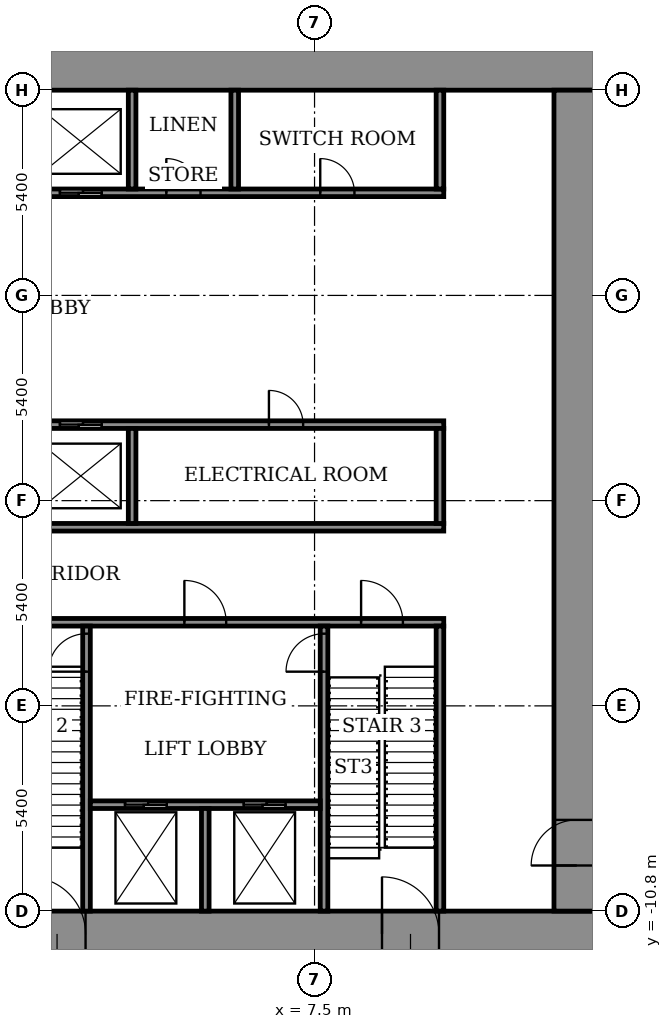
"""IFC4 building model, lengths in metres.
Left out: names, types, materials, properties, quantities, classifications, styles, units other than length and angle.
Written with IfcOpenShell. Run it as: python <this file> out.ifc"""

import sys

from ifc_helpers import new_model, si_unit, direction, frame, frame_2d, origin, place, context, subcontext, project, spatial, rectangle, extrude, element, fill, save


model = new_model("IFC4")
c1 = context("Model", 3, precision=1e-05, world=origin(), true_north=direction((0.0, 1.0)))
c2 = subcontext(c1, "Body", "Model", "MODEL_VIEW")
j1 = project(units=[si_unit("LENGTHUNIT", "METRE"), si_unit("PLANEANGLEUNIT", "RADIAN")], contexts=[c1])
p1 = place(None, origin())
s1 = spatial("IfcSite", under=j1, at=p1, CompositionType="ELEMENT")
p2 = place(p1, origin())
s2 = spatial("IfcBuilding", under=s1, at=p2, CompositionType="ELEMENT")
p3 = place(p2, origin())
s3 = spatial("IfcBuildingStorey", under=s2, at=p3, CompositionType="ELEMENT", Elevation=0.0)
p4 = place(p3, frame((-15.0, -11.4, 0.0), z_axis=(0.0, 0.0, 1.0), x_axis=(1.0, 0.0, 0.0)))
e1 = element("IfcWall", 1, at=p4, inside=s3, PredefinedType="SHEAR", context=c2, shape_type="SweptSolid", body=[
    extrude(rectangle(XDim=30.0, YDim=1.2, at=frame_2d((15.0, 0.0))), origin(), (0.0, 0.0, 1.0), 6.0),
])
p5 = place(p4, frame((5.725, 0.0, 0.0)))
e2 = element("IfcOpeningElement", 2, at=p5, cuts=e1, PredefinedType="OPENING", context=c2, shape_type="SweptSolid", body=[
    extrude(rectangle(XDim=1.5, YDim=2.1, at=frame_2d((0.75, 1.05))), frame((0.0, 0.61, 0.0), z_axis=(0.0, -1.0, 0.0), x_axis=(1.0, 0.0, 0.0)), (0.0, 0.0, 1.0), 1.22),
])
p6 = place(p4, frame((14.975, 0.0, 0.0)))
e3 = element("IfcOpeningElement", 3, at=p6, cuts=e1, PredefinedType="OPENING", context=c2, shape_type="SweptSolid", body=[
    extrude(rectangle(XDim=1.5, YDim=2.1, at=frame_2d((0.75, 1.05))), frame((0.0, 0.61, 0.0), z_axis=(0.0, -1.0, 0.0), x_axis=(1.0, 0.0, 0.0)), (0.0, 0.0, 1.0), 1.22),
])
p7 = place(p4, frame((24.275, 0.0, 0.0)))
e4 = element("IfcOpeningElement", 4, at=p7, cuts=e1, PredefinedType="OPENING", context=c2, shape_type="SweptSolid", body=[
    extrude(rectangle(XDim=1.5, YDim=2.1, at=frame_2d((0.75, 1.05))), frame((0.0, 0.61, 0.0), z_axis=(0.0, -1.0, 0.0), x_axis=(1.0, 0.0, 0.0)), (0.0, 0.0, 1.0), 1.22),
])
p8 = place(p3, frame((-15.0, 11.4, 0.0), z_axis=(0.0, 0.0, 1.0), x_axis=(1.0, 0.0, 0.0)))
e5 = element("IfcWall", 5, at=p8, inside=s3, PredefinedType="SHEAR", context=c2, shape_type="SweptSolid", body=[
    extrude(rectangle(XDim=30.0, YDim=1.2, at=frame_2d((15.0, 0.0))), origin(), (0.0, 0.0, 1.0), 6.0),
])
p9 = place(p3, frame((14.4, -10.8, 0.0), z_axis=(0.0, 0.0, 1.0), x_axis=(0.0, 1.0, 0.0)))
e6 = element("IfcWall", 6, at=p9, inside=s3, PredefinedType="SHEAR", context=c2, shape_type="SweptSolid", body=[
    extrude(rectangle(XDim=21.6, YDim=1.2, at=frame_2d((10.8, 0.0))), origin(), (0.0, 0.0, 1.0), 6.0),
])
p10 = place(p9, frame((1.2, 0.0, 0.0)))
e7 = element("IfcOpeningElement", 7, at=p10, cuts=e6, PredefinedType="OPENING", context=c2, shape_type="SweptSolid", body=[
    extrude(rectangle(XDim=1.2, YDim=2.1, at=frame_2d((0.6, 1.05))), frame((0.0, 0.61, 0.0), z_axis=(0.0, -1.0, 0.0), x_axis=(1.0, 0.0, 0.0)), (0.0, 0.0, 1.0), 1.22),
])
p11 = place(p3, frame((-10.9, -3.2, 0.0), z_axis=(0.0, 0.0, 1.0), x_axis=(1.0, 0.0, 0.0)))
e8 = element("IfcWall", 8, at=p11, inside=s3, PredefinedType="SHEAR", context=c2, shape_type="SweptSolid", body=[
    extrude(rectangle(XDim=21.8, YDim=0.2, at=frame_2d((10.9, 0.0))), origin(), (0.0, 0.0, 1.0), 5.45),
])
p12 = place(p11, frame((1.075, 0.0, 0.0)))
e9 = element("IfcOpeningElement", 9, at=p12, cuts=e8, PredefinedType="OPENING", context=c2, shape_type="SweptSolid", body=[
    extrude(rectangle(XDim=1.1, YDim=2.1, at=frame_2d((0.55, 1.05))), frame((0.0, 0.11, 0.0), z_axis=(0.0, -1.0, 0.0), x_axis=(1.0, 0.0, 0.0)), (0.0, 0.0, 1.0), 0.22),
])
p13 = place(p11, frame((10.325, 0.0, 0.0)))
e10 = element("IfcOpeningElement", 10, at=p13, cuts=e8, PredefinedType="OPENING", context=c2, shape_type="SweptSolid", body=[
    extrude(rectangle(XDim=1.1, YDim=2.1, at=frame_2d((0.55, 1.05))), frame((0.0, 0.11, 0.0), z_axis=(0.0, -1.0, 0.0), x_axis=(1.0, 0.0, 0.0)), (0.0, 0.0, 1.0), 0.22),
])
p14 = place(p11, frame((19.625, 0.0, 0.0)))
e11 = element("IfcOpeningElement", 11, at=p14, cuts=e8, PredefinedType="OPENING", context=c2, shape_type="SweptSolid", body=[
    extrude(rectangle(XDim=1.1, YDim=2.1, at=frame_2d((0.55, 1.05))), frame((0.0, 0.11, 0.0), z_axis=(0.0, -1.0, 0.0), x_axis=(1.0, 0.0, 0.0)), (0.0, 0.0, 1.0), 0.22),
])
p15 = place(p11, frame((5.7, 0.0, 0.0)))
e12 = element("IfcOpeningElement", 12, at=p15, cuts=e8, PredefinedType="OPENING", context=c2, shape_type="SweptSolid", body=[
    extrude(rectangle(XDim=1.1, YDim=2.1, at=frame_2d((0.55, 1.05))), frame((0.0, 0.11, 0.0), z_axis=(0.0, -1.0, 0.0), x_axis=(1.0, 0.0, 0.0)), (0.0, 0.0, 1.0), 0.22),
])
p16 = place(p11, frame((14.975, 0.0, 0.0)))
e13 = element("IfcOpeningElement", 13, at=p16, cuts=e8, PredefinedType="OPENING", context=c2, shape_type="SweptSolid", body=[
    extrude(rectangle(XDim=1.1, YDim=2.1, at=frame_2d((0.55, 1.05))), frame((0.0, 0.11, 0.0), z_axis=(0.0, -1.0, 0.0), x_axis=(1.0, 0.0, 0.0)), (0.0, 0.0, 1.0), 0.22),
])
p17 = place(p3, frame((-10.9, -0.7, 0.0), z_axis=(0.0, 0.0, 1.0), x_axis=(1.0, 0.0, 0.0)))
e14 = element("IfcWall", 14, at=p17, inside=s3, PredefinedType="SHEAR", context=c2, shape_type="SweptSolid", body=[
    extrude(rectangle(XDim=21.8, YDim=0.2, at=frame_2d((10.9, 0.0))), origin(), (0.0, 0.0, 1.0), 5.45),
])
p18 = place(p3, frame((-10.9, 2.0, 0.0), z_axis=(0.0, 0.0, 1.0), x_axis=(1.0, 0.0, 0.0)))
e15 = element("IfcWall", 15, at=p18, inside=s3, PredefinedType="SHEAR", context=c2, shape_type="SweptSolid", body=[
    extrude(rectangle(XDim=21.8, YDim=0.2, at=frame_2d((10.9, 0.0))), origin(), (0.0, 0.0, 1.0), 5.45),
])
p19 = place(p18, frame((0.9, 0.0, 0.0)))
e16 = element("IfcOpeningElement", 16, at=p19, cuts=e15, PredefinedType="OPENING", context=c2, shape_type="SweptSolid", body=[
    extrude(rectangle(XDim=1.1, YDim=2.1, at=frame_2d((0.55, 1.05))), frame((0.0, 0.11, 0.0), z_axis=(0.0, -1.0, 0.0), x_axis=(1.0, 0.0, 0.0)), (0.0, 0.0, 1.0), 0.22),
])
p20 = place(p18, frame((3.6, 0.0, 0.0)))
e17 = element("IfcOpeningElement", 17, at=p20, cuts=e15, PredefinedType="OPENING", context=c2, shape_type="SweptSolid", body=[
    extrude(rectangle(XDim=1.1, YDim=2.1, at=frame_2d((0.55, 1.05))), frame((0.0, 0.11, 0.0), z_axis=(0.0, -1.0, 0.0), x_axis=(1.0, 0.0, 0.0)), (0.0, 0.0, 1.0), 0.22),
])
p21 = place(p18, frame((6.3, 0.0, 0.0)))
e18 = element("IfcOpeningElement", 18, at=p21, cuts=e15, PredefinedType="OPENING", context=c2, shape_type="SweptSolid", body=[
    extrude(rectangle(XDim=1.1, YDim=2.1, at=frame_2d((0.55, 1.05))), frame((0.0, 0.11, 0.0), z_axis=(0.0, -1.0, 0.0), x_axis=(1.0, 0.0, 0.0)), (0.0, 0.0, 1.0), 0.22),
])
p22 = place(p18, frame((9.0, 0.0, 0.0)))
e19 = element("IfcOpeningElement", 19, at=p22, cuts=e15, PredefinedType="OPENING", context=c2, shape_type="SweptSolid", body=[
    extrude(rectangle(XDim=1.1, YDim=2.1, at=frame_2d((0.55, 1.05))), frame((0.0, 0.11, 0.0), z_axis=(0.0, -1.0, 0.0), x_axis=(1.0, 0.0, 0.0)), (0.0, 0.0, 1.0), 0.22),
])
p23 = place(p18, frame((11.7, 0.0, 0.0)))
e20 = element("IfcOpeningElement", 20, at=p23, cuts=e15, PredefinedType="OPENING", context=c2, shape_type="SweptSolid", body=[
    extrude(rectangle(XDim=1.1, YDim=2.1, at=frame_2d((0.55, 1.05))), frame((0.0, 0.11, 0.0), z_axis=(0.0, -1.0, 0.0), x_axis=(1.0, 0.0, 0.0)), (0.0, 0.0, 1.0), 0.22),
])
p24 = place(p18, frame((17.2, 0.0, 0.0)))
e21 = element("IfcOpeningElement", 21, at=p24, cuts=e15, PredefinedType="OPENING", context=c2, shape_type="SweptSolid", body=[
    extrude(rectangle(XDim=0.9, YDim=2.1, at=frame_2d((0.45, 1.05))), frame((0.0, 0.11, 0.0), z_axis=(0.0, -1.0, 0.0), x_axis=(1.0, 0.0, 0.0)), (0.0, 0.0, 1.0), 0.22),
])
p25 = place(p3, frame((-10.9, 8.1, 0.0), z_axis=(0.0, 0.0, 1.0), x_axis=(1.0, 0.0, 0.0)))
e22 = element("IfcWall", 22, at=p25, inside=s3, PredefinedType="SHEAR", context=c2, shape_type="SweptSolid", body=[
    extrude(rectangle(XDim=21.8, YDim=0.2, at=frame_2d((10.9, 0.0))), origin(), (0.0, 0.0, 1.0), 5.45),
])
p26 = place(p25, frame((0.9, 0.0, 0.0)))
e23 = element("IfcOpeningElement", 23, at=p26, cuts=e22, PredefinedType="OPENING", context=c2, shape_type="SweptSolid", body=[
    extrude(rectangle(XDim=1.1, YDim=2.1, at=frame_2d((0.55, 1.05))), frame((0.0, 0.11, 0.0), z_axis=(0.0, -1.0, 0.0), x_axis=(1.0, 0.0, 0.0)), (0.0, 0.0, 1.0), 0.22),
])
p27 = place(p25, frame((3.6, 0.0, 0.0)))
e24 = element("IfcOpeningElement", 24, at=p27, cuts=e22, PredefinedType="OPENING", context=c2, shape_type="SweptSolid", body=[
    extrude(rectangle(XDim=1.1, YDim=2.1, at=frame_2d((0.55, 1.05))), frame((0.0, 0.11, 0.0), z_axis=(0.0, -1.0, 0.0), x_axis=(1.0, 0.0, 0.0)), (0.0, 0.0, 1.0), 0.22),
])
p28 = place(p25, frame((6.3, 0.0, 0.0)))
e25 = element("IfcOpeningElement", 25, at=p28, cuts=e22, PredefinedType="OPENING", context=c2, shape_type="SweptSolid", body=[
    extrude(rectangle(XDim=1.1, YDim=2.1, at=frame_2d((0.55, 1.05))), frame((0.0, 0.11, 0.0), z_axis=(0.0, -1.0, 0.0), x_axis=(1.0, 0.0, 0.0)), (0.0, 0.0, 1.0), 0.22),
])
p29 = place(p25, frame((9.0, 0.0, 0.0)))
e26 = element("IfcOpeningElement", 26, at=p29, cuts=e22, PredefinedType="OPENING", context=c2, shape_type="SweptSolid", body=[
    extrude(rectangle(XDim=1.1, YDim=2.1, at=frame_2d((0.55, 1.05))), frame((0.0, 0.11, 0.0), z_axis=(0.0, -1.0, 0.0), x_axis=(1.0, 0.0, 0.0)), (0.0, 0.0, 1.0), 0.22),
])
p30 = place(p25, frame((11.7, 0.0, 0.0)))
e27 = element("IfcOpeningElement", 27, at=p30, cuts=e22, PredefinedType="OPENING", context=c2, shape_type="SweptSolid", body=[
    extrude(rectangle(XDim=1.1, YDim=2.1, at=frame_2d((0.55, 1.05))), frame((0.0, 0.11, 0.0), z_axis=(0.0, -1.0, 0.0), x_axis=(1.0, 0.0, 0.0)), (0.0, 0.0, 1.0), 0.22),
])
p31 = place(p25, frame((14.5, 0.0, 0.0)))
e28 = element("IfcOpeningElement", 28, at=p31, cuts=e22, PredefinedType="OPENING", context=c2, shape_type="SweptSolid", body=[
    extrude(rectangle(XDim=0.9, YDim=2.1, at=frame_2d((0.45, 1.05))), frame((0.0, 0.11, 0.0), z_axis=(0.0, -1.0, 0.0), x_axis=(1.0, 0.0, 0.0)), (0.0, 0.0, 1.0), 0.22),
])
p32 = place(p25, frame((18.55, 0.0, 0.0)))
e29 = element("IfcOpeningElement", 29, at=p32, cuts=e22, PredefinedType="OPENING", context=c2, shape_type="SweptSolid", body=[
    extrude(rectangle(XDim=0.9, YDim=2.1, at=frame_2d((0.45, 1.05))), frame((0.0, 0.11, 0.0), z_axis=(0.0, -1.0, 0.0), x_axis=(1.0, 0.0, 0.0)), (0.0, 0.0, 1.0), 0.22),
])
p33 = place(p3, frame((1.5, -10.8, 0.0), z_axis=(0.0, 0.0, 1.0), x_axis=(0.0, 1.0, 0.0)))
e30 = element("IfcWall", 30, at=p33, inside=s3, PredefinedType="SHEAR", context=c2, shape_type="SweptSolid", body=[
    extrude(rectangle(XDim=7.5, YDim=0.2, at=frame_2d((3.75, 0.0))), origin(), (0.0, 0.0, 1.0), 5.45),
])
p34 = place(p33, frame((6.3, 0.0, 0.0)))
e31 = element("IfcOpeningElement", 31, at=p34, cuts=e30, PredefinedType="OPENING", context=c2, shape_type="SweptSolid", body=[
    extrude(rectangle(XDim=1.0, YDim=2.1, at=frame_2d((0.5, 1.05))), frame((0.0, 0.11, 0.0), z_axis=(0.0, -1.0, 0.0), x_axis=(1.0, 0.0, 0.0)), (0.0, 0.0, 1.0), 0.22),
])
p35 = place(p3, frame((7.75, -10.8, 0.0), z_axis=(0.0, 0.0, 1.0), x_axis=(0.0, 1.0, 0.0)))
e32 = element("IfcWall", 32, at=p35, inside=s3, PredefinedType="SHEAR", context=c2, shape_type="SweptSolid", body=[
    extrude(rectangle(XDim=7.5, YDim=0.2, at=frame_2d((3.75, 0.0))), origin(), (0.0, 0.0, 1.0), 5.45),
])
p36 = place(p35, frame((6.3, 0.0, 0.0)))
e33 = element("IfcOpeningElement", 33, at=p36, cuts=e32, PredefinedType="OPENING", context=c2, shape_type="SweptSolid", body=[
    extrude(rectangle(XDim=1.0, YDim=2.1, at=frame_2d((0.5, 1.05))), frame((0.0, 0.11, 0.0), z_axis=(0.0, -1.0, 0.0), x_axis=(1.0, 0.0, 0.0)), (0.0, 0.0, 1.0), 0.22),
])
p37 = place(p3, frame((10.8, -10.8, 0.0), z_axis=(0.0, 0.0, 1.0), x_axis=(0.0, 1.0, 0.0)))
e34 = element("IfcWall", 34, at=p37, inside=s3, PredefinedType="SHEAR", context=c2, shape_type="SweptSolid", body=[
    extrude(rectangle(XDim=7.5, YDim=0.2, at=frame_2d((3.75, 0.0))), origin(), (0.0, 0.0, 1.0), 5.45),
])
p38 = place(p3, frame((1.6, -8.0, 0.0), z_axis=(0.0, 0.0, 1.0), x_axis=(1.0, 0.0, 0.0)))
e35 = element("IfcWall", 35, at=p38, inside=s3, PredefinedType="SHEAR", context=c2, shape_type="SweptSolid", body=[
    extrude(rectangle(XDim=6.05, YDim=0.2, at=frame_2d((3.025, 0.0))), origin(), (0.0, 0.0, 1.0), 5.45),
])
p39 = place(p38, frame((0.913, 0.0, 0.0)))
e36 = element("IfcOpeningElement", 36, at=p39, cuts=e35, PredefinedType="OPENING", context=c2, shape_type="SweptSolid", body=[
    extrude(rectangle(XDim=1.1, YDim=2.1, at=frame_2d((0.55, 1.05))), frame((0.0, 0.11, 0.0), z_axis=(0.0, -1.0, 0.0), x_axis=(1.0, 0.0, 0.0)), (0.0, 0.0, 1.0), 0.22),
])
p40 = place(p38, frame((4.038, 0.0, 0.0)))
e37 = element("IfcOpeningElement", 37, at=p40, cuts=e35, PredefinedType="OPENING", context=c2, shape_type="SweptSolid", body=[
    extrude(rectangle(XDim=1.1, YDim=2.1, at=frame_2d((0.55, 1.05))), frame((0.0, 0.11, 0.0), z_axis=(0.0, -1.0, 0.0), x_axis=(1.0, 0.0, 0.0)), (0.0, 0.0, 1.0), 0.22),
])
p41 = place(p3, frame((4.625, -10.8, 0.0), z_axis=(0.0, 0.0, 1.0), x_axis=(0.0, 1.0, 0.0)))
e38 = element("IfcWall", 38, at=p41, inside=s3, PredefinedType="SHEAR", context=c2, shape_type="SweptSolid", body=[
    extrude(rectangle(XDim=2.7, YDim=0.2, at=frame_2d((1.35, 0.0))), origin(), (0.0, 0.0, 1.0), 5.45),
])
p42 = place(p3, frame((2.7, -0.6, 0.0), z_axis=(0.0, 0.0, 1.0), x_axis=(0.0, 1.0, 0.0)))
e39 = element("IfcWall", 39, at=p42, inside=s3, PredefinedType="SHEAR", context=c2, shape_type="SweptSolid", body=[
    extrude(rectangle(XDim=2.5, YDim=0.2, at=frame_2d((1.25, 0.0))), origin(), (0.0, 0.0, 1.0), 5.45),
])
p43 = place(p3, frame((10.8, -0.6, 0.0), z_axis=(0.0, 0.0, 1.0), x_axis=(0.0, 1.0, 0.0)))
e40 = element("IfcWall", 40, at=p43, inside=s3, PredefinedType="STANDARD", context=c2, shape_type="SweptSolid", body=[
    extrude(rectangle(XDim=2.5, YDim=0.2, at=frame_2d((1.25, 0.0))), origin(), (0.0, 0.0, 1.0), 5.45),
])
p44 = place(p3, frame((2.7, 8.2, 0.0), z_axis=(0.0, 0.0, 1.0), x_axis=(0.0, 1.0, 0.0)))
e41 = element("IfcWall", 41, at=p44, inside=s3, PredefinedType="SHEAR", context=c2, shape_type="SweptSolid", body=[
    extrude(rectangle(XDim=2.6, YDim=0.2, at=frame_2d((1.3, 0.0))), origin(), (0.0, 0.0, 1.0), 5.45),
])
for number, where, z_axis, x_axis in (
    (42, (5.4, 8.2, 0.0), (0.0, 0.0, 1.0), (0.0, 1.0, 0.0)),
    (43, (10.8, 8.2, 0.0), (0.0, 0.0, 1.0), (0.0, 1.0, 0.0)),
):
    element("IfcWall", number, at=place(p3, frame(where, z_axis=z_axis, x_axis=x_axis)), inside=s3, PredefinedType="STANDARD", context=c2, shape_type="SweptSolid", body=[
        extrude(rectangle(XDim=2.6, YDim=0.2, at=frame_2d((1.3, 0.0))), origin(), (0.0, 0.0, 1.0), 5.45),
    ])
p45 = place(p10, origin())
e44 = element("IfcDoor", 44, at=p45, inside=s3, OperationType="DOUBLE_DOOR_SINGLE_SWING", PredefinedType="DOOR", context=c2, shape_type="SweptSolid", body=[
    extrude(rectangle(XDim=1.2, YDim=2.1, at=frame_2d((0.6, 1.05))), frame((0.0, 0.025, 0.0), z_axis=(0.0, -1.0, 0.0), x_axis=(1.0, 0.0, 0.0)), (0.0, 0.0, 1.0), 0.05),
])
fill(e7, e44)
p46 = place(p6, origin())
e45 = element("IfcDoor", 45, at=p46, inside=s3, OperationType="DOUBLE_DOOR_SINGLE_SWING", PredefinedType="DOOR", context=c2, shape_type="SweptSolid", body=[
    extrude(rectangle(XDim=1.5, YDim=2.1, at=frame_2d((0.75, 1.05))), frame((0.0, 0.025, 0.0), z_axis=(0.0, -1.0, 0.0), x_axis=(1.0, 0.0, 0.0)), (0.0, 0.0, 1.0), 0.05),
])
fill(e3, e45)
p47 = place(p7, origin())
e46 = element("IfcDoor", 46, at=p47, inside=s3, OperationType="DOUBLE_DOOR_SINGLE_SWING", PredefinedType="DOOR", context=c2, shape_type="SweptSolid", body=[
    extrude(rectangle(XDim=1.5, YDim=2.1, at=frame_2d((0.75, 1.05))), frame((0.0, 0.025, 0.0), z_axis=(0.0, -1.0, 0.0), x_axis=(1.0, 0.0, 0.0)), (0.0, 0.0, 1.0), 0.05),
])
fill(e4, e46)
p48 = place(p23, origin())
e47 = element("IfcDoor", 47, at=p48, inside=s3, OperationType="SLIDING_TO_LEFT", PredefinedType="DOOR", context=c2, shape_type="SweptSolid", body=[
    extrude(rectangle(XDim=1.1, YDim=2.1, at=frame_2d((0.55, 1.05))), frame((0.0, 0.025, 0.0), z_axis=(0.0, -1.0, 0.0), x_axis=(1.0, 0.0, 0.0)), (0.0, 0.0, 1.0), 0.05),
])
fill(e20, e47)
p49 = place(p30, origin())
e48 = element("IfcDoor", 48, at=p49, inside=s3, OperationType="SLIDING_TO_LEFT", PredefinedType="DOOR", context=c2, shape_type="SweptSolid", body=[
    extrude(rectangle(XDim=1.1, YDim=2.1, at=frame_2d((0.55, 1.05))), frame((0.0, 0.025, 0.0), z_axis=(0.0, -1.0, 0.0), x_axis=(1.0, 0.0, 0.0)), (0.0, 0.0, 1.0), 0.05),
])
fill(e27, e48)
p50 = place(p24, origin())
e49 = element("IfcDoor", 49, at=p50, inside=s3, OperationType="SINGLE_SWING_LEFT", PredefinedType="DOOR", context=c2, shape_type="SweptSolid", body=[
    extrude(rectangle(XDim=0.9, YDim=2.1, at=frame_2d((0.45, 1.05))), frame((0.0, 0.025, 0.0), z_axis=(0.0, -1.0, 0.0), x_axis=(1.0, 0.0, 0.0)), (0.0, 0.0, 1.0), 0.05),
])
fill(e21, e49)
p51 = place(p31, origin())
e50 = element("IfcDoor", 50, at=p51, inside=s3, OperationType="SINGLE_SWING_RIGHT", PredefinedType="DOOR", context=c2, shape_type="SweptSolid", body=[
    extrude(rectangle(XDim=0.9, YDim=2.1, at=frame_2d((0.45, 1.05))), frame((0.0, 0.025, 0.0), z_axis=(0.0, -1.0, 0.0), x_axis=(1.0, 0.0, 0.0)), (0.0, 0.0, 1.0), 0.05),
])
fill(e28, e50)
p52 = place(p32, origin())
e51 = element("IfcDoor", 51, at=p52, inside=s3, OperationType="SINGLE_SWING_LEFT", PredefinedType="DOOR", context=c2, shape_type="SweptSolid", body=[
    extrude(rectangle(XDim=0.9, YDim=2.1, at=frame_2d((0.45, 1.05))), frame((0.0, 0.025, 0.0), z_axis=(0.0, -1.0, 0.0), x_axis=(1.0, 0.0, 0.0)), (0.0, 0.0, 1.0), 0.05),
])
fill(e29, e51)
p53 = place(p39, origin())
e52 = element("IfcDoor", 52, at=p53, inside=s3, OperationType="SLIDING_TO_LEFT", PredefinedType="DOOR", context=c2, shape_type="SweptSolid", body=[
    extrude(rectangle(XDim=1.1, YDim=2.1, at=frame_2d((0.55, 1.05))), frame((0.0, 0.025, 0.0), z_axis=(0.0, -1.0, 0.0), x_axis=(1.0, 0.0, 0.0)), (0.0, 0.0, 1.0), 0.05),
])
fill(e36, e52)
p54 = place(p40, origin())
e53 = element("IfcDoor", 53, at=p54, inside=s3, OperationType="SLIDING_TO_LEFT", PredefinedType="DOOR", context=c2, shape_type="SweptSolid", body=[
    extrude(rectangle(XDim=1.1, YDim=2.1, at=frame_2d((0.55, 1.05))), frame((0.0, 0.025, 0.0), z_axis=(0.0, -1.0, 0.0), x_axis=(1.0, 0.0, 0.0)), (0.0, 0.0, 1.0), 0.05),
])
fill(e37, e53)
p55 = place(p14, origin())
e54 = element("IfcDoor", 54, at=p55, inside=s3, OperationType="SINGLE_SWING_RIGHT", PredefinedType="DOOR", context=c2, shape_type="SweptSolid", body=[
    extrude(rectangle(XDim=1.1, YDim=2.1, at=frame_2d((0.55, 1.05))), frame((0.0, 0.025, 0.0), z_axis=(0.0, -1.0, 0.0), x_axis=(1.0, 0.0, 0.0)), (0.0, 0.0, 1.0), 0.05),
])
fill(e11, e54)
p56 = place(p16, origin())
e55 = element("IfcDoor", 55, at=p56, inside=s3, OperationType="SINGLE_SWING_LEFT", PredefinedType="DOOR", context=c2, shape_type="SweptSolid", body=[
    extrude(rectangle(XDim=1.1, YDim=2.1, at=frame_2d((0.55, 1.05))), frame((0.0, 0.025, 0.0), z_axis=(0.0, -1.0, 0.0), x_axis=(1.0, 0.0, 0.0)), (0.0, 0.0, 1.0), 0.05),
])
fill(e13, e55)
p57 = place(p34, origin())
e56 = element("IfcDoor", 56, at=p57, inside=s3, OperationType="SINGLE_SWING_RIGHT", PredefinedType="DOOR", context=c2, shape_type="SweptSolid", body=[
    extrude(rectangle(XDim=1.0, YDim=2.1, at=frame_2d((0.5, 1.05))), frame((0.0, 0.025, 0.0), z_axis=(0.0, -1.0, 0.0), x_axis=(1.0, 0.0, 0.0)), (0.0, 0.0, 1.0), 0.05),
])
fill(e31, e56)
p58 = place(p36, origin())
e57 = element("IfcDoor", 57, at=p58, inside=s3, OperationType="SINGLE_SWING_RIGHT", PredefinedType="DOOR", context=c2, shape_type="SweptSolid", body=[
    extrude(rectangle(XDim=1.0, YDim=2.1, at=frame_2d((0.5, 1.05))), frame((0.0, 0.025, 0.0), z_axis=(0.0, -1.0, 0.0), x_axis=(1.0, 0.0, 0.0)), (0.0, 0.0, 1.0), 0.05),
])
fill(e33, e57)
save(model, sys.argv[1])
